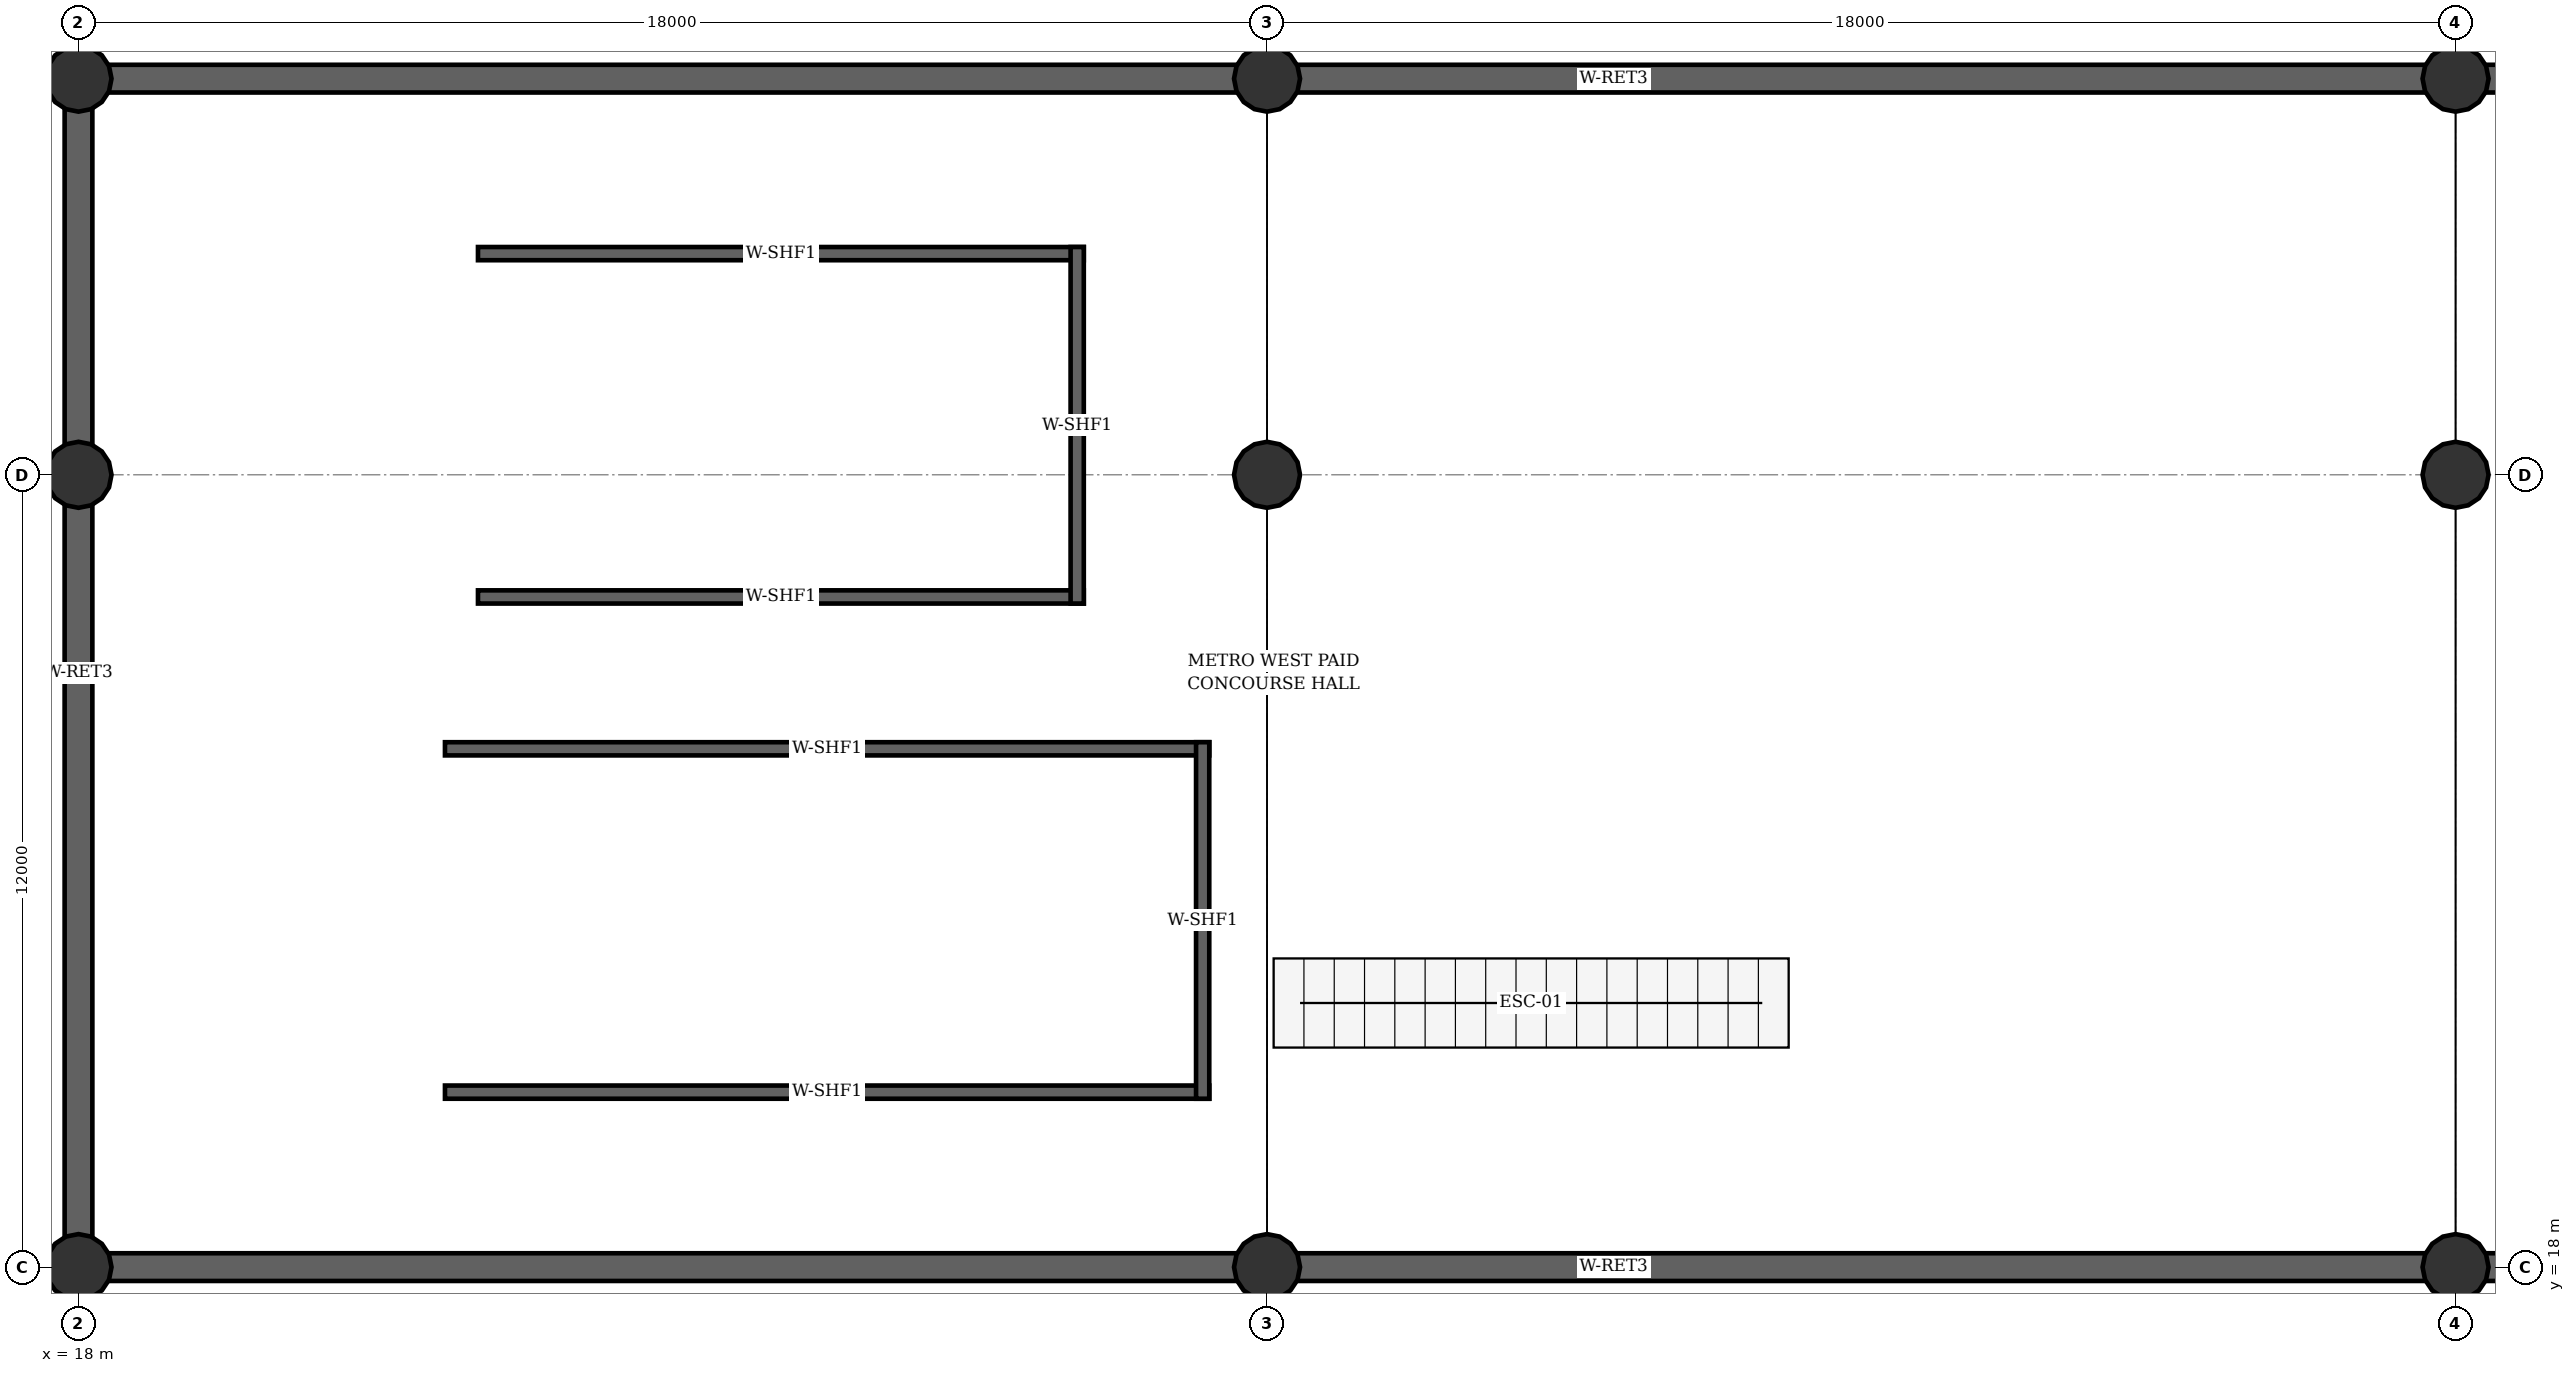
"""IFC4 building model, lengths in metres.
Left out: names, types, materials, properties, quantities, classifications, styles, units other than length and angle.
Written with IfcOpenShell. Run it as: python <this file> out.ifc"""

import sys

from ifc_helpers import new_model, si_unit, direction, frame, frame_2d, origin, origin_2d, place, context, subcontext, project, spatial, rectangle, circle, extrude, element, save


model = new_model("IFC4")
c1 = context("Model", 3, precision=1e-05, world=origin(), true_north=direction((0.0, 1.0)))
c2 = subcontext(c1, "Body", "Model", "MODEL_VIEW")
j1 = project(units=[si_unit("LENGTHUNIT", "METRE"), si_unit("PLANEANGLEUNIT", "RADIAN")], contexts=[c1])
p1 = place(None, origin())
s1 = spatial("IfcSite", under=j1, at=p1, CompositionType="ELEMENT")
p2 = place(p1, origin())
s2 = spatial("IfcBuilding", under=s1, at=p2, CompositionType="ELEMENT")
p3 = place(p2, frame((0.0, 0.0, -5.4)))
s3 = spatial("IfcBuildingStorey", under=s2, at=p3, CompositionType="ELEMENT", Elevation=-5.4)
for number, where, z_axis, x_axis in (
    (1, (18.0, 18.0, 0.0), (0.0, 0.0, 1.0), (1.0, 0.0, 0.0)),
    (2, (18.0, 30.0, 0.0), (0.0, 0.0, 1.0), (1.0, 0.0, 0.0)),
    (3, (18.0, 36.0, 0.0), (0.0, 0.0, 1.0), (1.0, 0.0, 0.0)),
    (4, (36.0, 18.0, 0.0), (0.0, 0.0, 1.0), (1.0, 0.0, 0.0)),
    (5, (36.0, 30.0, 0.0), (0.0, 0.0, 1.0), (1.0, 0.0, 0.0)),
    (6, (36.0, 36.0, 0.0), (0.0, 0.0, 1.0), (1.0, 0.0, 0.0)),
    (7, (54.0, 18.0, 0.0), (0.0, 0.0, 1.0), (1.0, 0.0, 0.0)),
    (8, (54.0, 30.0, 0.0), (0.0, 0.0, 1.0), (1.0, 0.0, 0.0)),
    (9, (54.0, 36.0, 0.0), (0.0, 0.0, 1.0), (1.0, 0.0, 0.0)),
):
    element("IfcColumn", number, at=place(p3, frame(where, z_axis=z_axis, x_axis=x_axis)), inside=s3, PredefinedType="COLUMN", context=c2, shape_type="SweptSolid", body=[
        extrude(circle(Radius=0.5, at=origin_2d()), origin(), (0.0, 0.0, 1.0), 5.4),
    ])
for number, where, z_axis, x_axis in (
    (10, (18.0, 18.0, 0.0), (0.0, 0.0, 1.0), (1.0, 0.0, 0.0)),
    (11, (90.0, 36.0, 0.0), (0.0, 0.0, 1.0), (-1.0, 0.0, 0.0)),
):
    element("IfcWall", number, at=place(p3, frame(where, z_axis=z_axis, x_axis=x_axis)), inside=s3, PredefinedType="USERDEFINED", context=c2, shape_type="SweptSolid", body=[
        extrude(rectangle(XDim=72.0, YDim=0.42, at=frame_2d((36.0, 0.0))), origin(), (0.0, 0.0, 1.0), 5.05),
    ])
p4 = place(p3, frame((18.0, 36.0, 0.0), z_axis=(0.0, 0.0, 1.0), x_axis=(0.0, -1.0, 0.0)))
e12 = element("IfcWall", 12, at=p4, inside=s3, PredefinedType="USERDEFINED", context=c2, shape_type="SweptSolid", body=[
    extrude(rectangle(XDim=18.0, YDim=0.42, at=frame_2d((9.0, 0.0))), origin(), (0.0, 0.0, 1.0), 5.05),
])
for number, where, z_axis, x_axis in (
    (13, (23.55, 20.65, 0.0), (0.0, 0.0, 1.0), (1.0, 0.0, 0.0)),
    (14, (35.125, 25.85, 0.0), (0.0, 0.0, 1.0), (-1.0, 0.0, 0.0)),
):
    element("IfcWall", number, at=place(p3, frame(where, z_axis=z_axis, x_axis=x_axis)), inside=s3, PredefinedType="SOLIDWALL", context=c2, shape_type="SweptSolid", body=[
        extrude(rectangle(XDim=11.575, YDim=0.2, at=frame_2d((5.788, 0.0))), origin(), (0.0, 0.0, 1.0), 5.05),
    ])
p5 = place(p3, frame((35.025, 20.55, 0.0), z_axis=(0.0, 0.0, 1.0), x_axis=(0.0, 1.0, 0.0)))
e15 = element("IfcWall", 15, at=p5, inside=s3, PredefinedType="SOLIDWALL", context=c2, shape_type="SweptSolid", body=[
    extrude(rectangle(XDim=5.4, YDim=0.2, at=frame_2d((2.7, 0.0))), origin(), (0.0, 0.0, 1.0), 5.05),
])
for number, where, z_axis, x_axis in (
    (16, (24.05, 28.15, 0.0), (0.0, 0.0, 1.0), (1.0, 0.0, 0.0)),
    (17, (33.225, 33.35, 0.0), (0.0, 0.0, 1.0), (-1.0, 0.0, 0.0)),
):
    element("IfcWall", number, at=place(p3, frame(where, z_axis=z_axis, x_axis=x_axis)), inside=s3, PredefinedType="SOLIDWALL", context=c2, shape_type="SweptSolid", body=[
        extrude(rectangle(XDim=9.175, YDim=0.2, at=frame_2d((4.587, 0.0))), origin(), (0.0, 0.0, 1.0), 5.05),
    ])
p6 = place(p3, frame((33.125, 28.05, 0.0), z_axis=(0.0, 0.0, 1.0), x_axis=(0.0, 1.0, 0.0)))
e18 = element("IfcWall", 18, at=p6, inside=s3, PredefinedType="SOLIDWALL", context=c2, shape_type="SweptSolid", body=[
    extrude(rectangle(XDim=5.4, YDim=0.2, at=frame_2d((2.7, 0.0))), origin(), (0.0, 0.0, 1.0), 5.05),
])
save(model, sys.argv[1])
